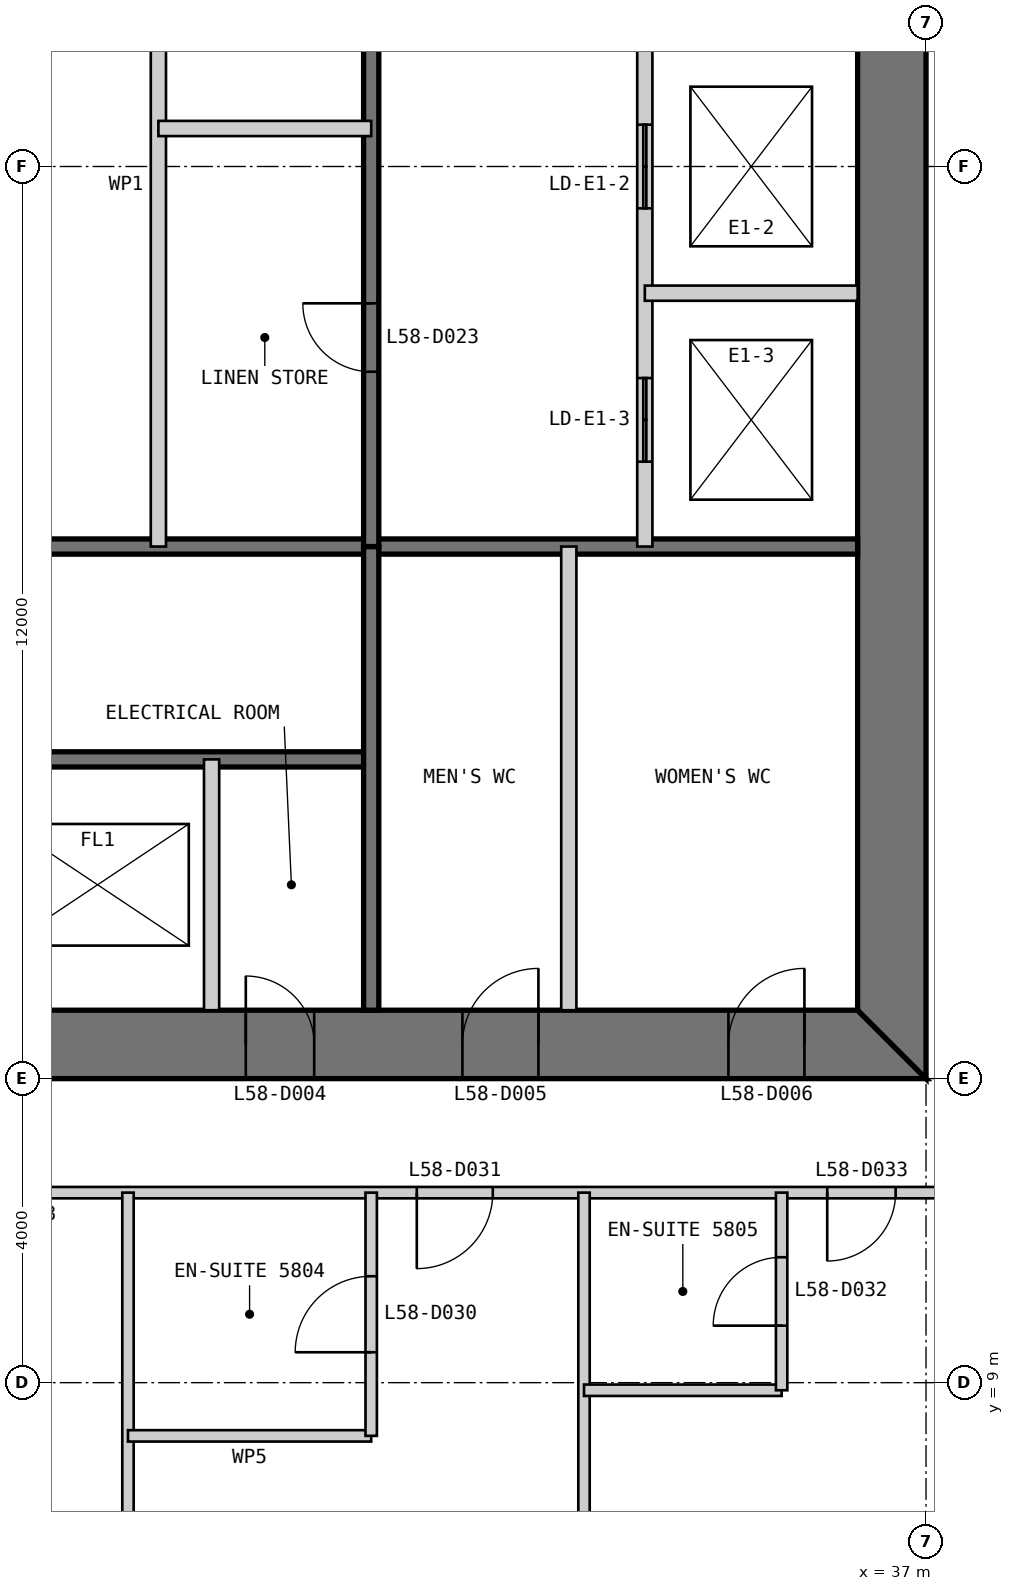
"""IFC4 building model, lengths in metres.
Left out: names, types, materials, properties, quantities, classifications, styles, units other than length and angle.
Written with IfcOpenShell. Run it as: python <this file> out.ifc"""

import sys

from ifc_helpers import new_model, si_unit, direction, frame, frame_2d, origin, place, context, subcontext, project, spatial, polyline, rectangle, outline, extrude, element, fill, save


model = new_model("IFC4")
c1 = context("Model", 3, precision=1e-05, world=origin(), true_north=direction((0.0, 1.0)))
c2 = subcontext(c1, "Body", "Model", "MODEL_VIEW")
j1 = project(units=[si_unit("LENGTHUNIT", "METRE"), si_unit("PLANEANGLEUNIT", "RADIAN")], contexts=[c1])
p1 = place(None, origin())
s1 = spatial("IfcSite", under=j1, at=p1, CompositionType="ELEMENT")
p2 = place(p1, origin())
s2 = spatial("IfcBuilding", under=s1, at=p2, CompositionType="ELEMENT")
p3 = place(p2, frame((0.0, 0.0, 249.2)))
s3 = spatial("IfcBuildingStorey", under=s2, at=p3, CompositionType="ELEMENT", Elevation=249.2)
p4 = place(p3, frame((13.0, 13.45, 0.0), z_axis=(0.0, 0.0, 1.0), x_axis=(1.0, 0.0, 0.0)))
e1 = element("IfcWall", 1, at=p4, inside=s3, PredefinedType="SHEAR", context=c2, shape_type="SweptSolid", body=[
    extrude(outline(polyline([(0.0, -0.45), (24.0, -0.45), (23.1, 0.45), (0.9, 0.45), (0.0, -0.45)])), origin(), (0.0, 0.0, 1.0), 3.4),
])
p5 = place(p4, frame((4.9, 0.0, 0.0)))
e2 = element("IfcOpeningElement", 2, at=p5, cuts=e1, PredefinedType="OPENING", context=c2, shape_type="SweptSolid", body=[
    extrude(rectangle(XDim=1.0, YDim=2.2, at=frame_2d((0.5, 1.1))), frame((0.0, 0.46, 0.0), z_axis=(0.0, -1.0, 0.0), x_axis=(1.0, 0.0, 0.0)), (0.0, 0.0, 1.0), 0.92),
])
p6 = place(p4, frame((8.9, 0.0, 0.0)))
e3 = element("IfcOpeningElement", 3, at=p6, cuts=e1, PredefinedType="OPENING", context=c2, shape_type="SweptSolid", body=[
    extrude(rectangle(XDim=1.1, YDim=2.2, at=frame_2d((0.55, 1.1))), frame((0.0, 0.46, 0.0), z_axis=(0.0, -1.0, 0.0), x_axis=(1.0, 0.0, 0.0)), (0.0, 0.0, 1.0), 0.92),
])
p7 = place(p4, frame((15.05, 0.0, 0.0)))
e4 = element("IfcOpeningElement", 4, at=p7, cuts=e1, PredefinedType="OPENING", context=c2, shape_type="SweptSolid", body=[
    extrude(rectangle(XDim=0.9, YDim=2.2, at=frame_2d((0.45, 1.1))), frame((0.0, 0.46, 0.0), z_axis=(0.0, -1.0, 0.0), x_axis=(1.0, 0.0, 0.0)), (0.0, 0.0, 1.0), 0.92),
])
p8 = place(p4, frame((17.9, 0.0, 0.0)))
e5 = element("IfcOpeningElement", 5, at=p8, cuts=e1, PredefinedType="OPENING", context=c2, shape_type="SweptSolid", body=[
    extrude(rectangle(XDim=1.0, YDim=2.2, at=frame_2d((0.5, 1.1))), frame((0.0, 0.46, 0.0), z_axis=(0.0, -1.0, 0.0), x_axis=(1.0, 0.0, 0.0)), (0.0, 0.0, 1.0), 0.92),
])
p9 = place(p4, frame((21.4, 0.0, 0.0)))
e6 = element("IfcOpeningElement", 6, at=p9, cuts=e1, PredefinedType="OPENING", context=c2, shape_type="SweptSolid", body=[
    extrude(rectangle(XDim=1.0, YDim=2.2, at=frame_2d((0.5, 1.1))), frame((0.0, 0.46, 0.0), z_axis=(0.0, -1.0, 0.0), x_axis=(1.0, 0.0, 0.0)), (0.0, 0.0, 1.0), 0.92),
])
p10 = place(p3, frame((36.55, 13.9, 0.0), z_axis=(0.0, 0.0, 1.0), x_axis=(0.0, 1.0, 0.0)))
e7 = element("IfcWall", 7, at=p10, inside=s3, PredefinedType="SHEAR", context=c2, shape_type="SweptSolid", body=[
    extrude(outline(polyline([(-0.9, -0.45), (23.1, -0.45), (22.2, 0.45), (0.0, 0.45), (-0.9, -0.45)])), origin(), (0.0, 0.0, 1.0), 3.4),
])
p11 = place(p10, frame((20.2, 0.0, 0.0)))
e8 = element("IfcOpeningElement", 8, at=p11, cuts=e7, PredefinedType="OPENING", context=c2, shape_type="SweptSolid", body=[
    extrude(rectangle(XDim=1.0, YDim=2.2, at=frame_2d((0.5, 1.1))), frame((0.0, 0.46, 0.0), z_axis=(0.0, -1.0, 0.0), x_axis=(1.0, 0.0, 0.0)), (0.0, 0.0, 1.0), 0.92),
])
p12 = place(p10, frame((17.25, 0.0, 0.0)))
e9 = element("IfcOpeningElement", 9, at=p12, cuts=e7, PredefinedType="OPENING", context=c2, shape_type="SweptSolid", body=[
    extrude(rectangle(XDim=0.9, YDim=2.2, at=frame_2d((0.45, 1.1))), frame((0.0, 0.46, 0.0), z_axis=(0.0, -1.0, 0.0), x_axis=(1.0, 0.0, 0.0)), (0.0, 0.0, 1.0), 0.92),
])
p13 = place(p3, frame((20.3, 17.2, 0.0), z_axis=(0.0, 0.0, 1.0), x_axis=(1.0, 0.0, 0.0)))
e10 = element("IfcWall", 10, at=p13, inside=s3, PredefinedType="SOLIDWALL", context=c2, shape_type="SweptSolid", body=[
    extrude(rectangle(XDim=9.4, YDim=0.2, at=frame_2d((4.7, 0.0))), origin(), (0.0, 0.0, 1.0), 3.2),
])
p14 = place(p13, frame((0.25, 0.0, 0.0)))
e11 = element("IfcOpeningElement", 11, at=p14, cuts=e10, PredefinedType="OPENING", context=c2, shape_type="SweptSolid", body=[
    extrude(rectangle(XDim=1.0, YDim=2.2, at=frame_2d((0.5, 1.1))), frame((0.0, 0.11, 0.0), z_axis=(0.0, -1.0, 0.0), x_axis=(1.0, 0.0, 0.0)), (0.0, 0.0, 1.0), 0.22),
])
p15 = place(p3, frame((20.3, 20.0, 0.0), z_axis=(0.0, 0.0, 1.0), x_axis=(1.0, 0.0, 0.0)))
e12 = element("IfcWall", 12, at=p15, inside=s3, PredefinedType="SOLIDWALL", context=c2, shape_type="SweptSolid", body=[
    extrude(rectangle(XDim=15.8, YDim=0.2, at=frame_2d((7.9, 0.0))), origin(), (0.0, 0.0, 1.0), 3.2),
])
p16 = place(p3, frame((27.6, 13.9, 0.0), z_axis=(0.0, 0.0, 1.0), x_axis=(0.0, 1.0, 0.0)))
e13 = element("IfcWall", 13, at=p16, inside=s3, PredefinedType="PARTITIONING", context=c2, shape_type="SweptSolid", body=[
    extrude(rectangle(XDim=3.3, YDim=0.2, at=frame_2d((1.65, 0.0))), origin(), (0.0, 0.0, 1.0), 3.2),
])
p17 = place(p3, frame((29.7, 13.9, 0.0), z_axis=(0.0, 0.0, 1.0), x_axis=(0.0, 1.0, 0.0)))
e14 = element("IfcWall", 14, at=p17, inside=s3, PredefinedType="SOLIDWALL", context=c2, shape_type="SweptSolid", body=[
    extrude(rectangle(XDim=6.1, YDim=0.2, at=frame_2d((3.05, 0.0))), origin(), (0.0, 0.0, 1.0), 3.2),
])
p18 = place(p3, frame((32.3, 13.9, 0.0), z_axis=(0.0, 0.0, 1.0), x_axis=(0.0, 1.0, 0.0)))
e15 = element("IfcWall", 15, at=p18, inside=s3, PredefinedType="PARTITIONING", context=c2, shape_type="SweptSolid", body=[
    extrude(rectangle(XDim=6.1, YDim=0.2, at=frame_2d((3.05, 0.0))), origin(), (0.0, 0.0, 1.0), 3.2),
])
p19 = place(p3, frame((33.3, 36.1, 0.0), z_axis=(0.0, 0.0, 1.0), x_axis=(0.0, -1.0, 0.0)))
e16 = element("IfcWall", 16, at=p19, inside=s3, PredefinedType="PARTITIONING", context=c2, shape_type="SweptSolid", body=[
    extrude(rectangle(XDim=16.1, YDim=0.2, at=frame_2d((8.05, 0.0))), origin(), (0.0, 0.0, 1.0), 3.2),
])
p20 = place(p19, frame((7.217, 0.0, 0.0)))
e17 = element("IfcOpeningElement", 17, at=p20, cuts=e16, PredefinedType="OPENING", context=c2, shape_type="SweptSolid", body=[
    extrude(rectangle(XDim=1.1, YDim=2.2, at=frame_2d((0.55, 1.1))), frame((0.0, 0.11, 0.0), z_axis=(0.0, -1.0, 0.0), x_axis=(1.0, 0.0, 0.0)), (0.0, 0.0, 1.0), 0.22),
])
p21 = place(p19, frame((10.55, 0.0, 0.0)))
e18 = element("IfcOpeningElement", 18, at=p21, cuts=e16, PredefinedType="OPENING", context=c2, shape_type="SweptSolid", body=[
    extrude(rectangle(XDim=1.1, YDim=2.2, at=frame_2d((0.55, 1.1))), frame((0.0, 0.11, 0.0), z_axis=(0.0, -1.0, 0.0), x_axis=(1.0, 0.0, 0.0)), (0.0, 0.0, 1.0), 0.22),
])
p22 = place(p19, frame((13.883, 0.0, 0.0)))
e19 = element("IfcOpeningElement", 19, at=p22, cuts=e16, PredefinedType="OPENING", context=c2, shape_type="SweptSolid", body=[
    extrude(rectangle(XDim=1.1, YDim=2.2, at=frame_2d((0.55, 1.1))), frame((0.0, 0.11, 0.0), z_axis=(0.0, -1.0, 0.0), x_axis=(1.0, 0.0, 0.0)), (0.0, 0.0, 1.0), 0.22),
])
p23 = place(p3, frame((29.7, 36.1, 0.0), z_axis=(0.0, 0.0, 1.0), x_axis=(0.0, -1.0, 0.0)))
e20 = element("IfcWall", 20, at=p23, inside=s3, PredefinedType="SOLIDWALL", context=c2, shape_type="SweptSolid", body=[
    extrude(rectangle(XDim=16.1, YDim=0.2, at=frame_2d((8.05, 0.0))), origin(), (0.0, 0.0, 1.0), 3.2),
])
p24 = place(p23, frame((7.9, 0.0, 0.0)))
e21 = element("IfcOpeningElement", 21, at=p24, cuts=e20, PredefinedType="OPENING", context=c2, shape_type="SweptSolid", body=[
    extrude(rectangle(XDim=0.9, YDim=2.2, at=frame_2d((0.45, 1.1))), frame((0.0, 0.11, 0.0), z_axis=(0.0, -1.0, 0.0), x_axis=(1.0, 0.0, 0.0)), (0.0, 0.0, 1.0), 0.22),
])
p25 = place(p23, frame((12.9, 0.0, 0.0)))
e22 = element("IfcOpeningElement", 22, at=p25, cuts=e20, PredefinedType="OPENING", context=c2, shape_type="SweptSolid", body=[
    extrude(rectangle(XDim=0.9, YDim=2.2, at=frame_2d((0.45, 1.1))), frame((0.0, 0.11, 0.0), z_axis=(0.0, -1.0, 0.0), x_axis=(1.0, 0.0, 0.0)), (0.0, 0.0, 1.0), 0.22),
])
p26 = place(p3, frame((36.1, 23.333, 0.0), z_axis=(0.0, 0.0, 1.0), x_axis=(-1.0, 0.0, 0.0)))
e23 = element("IfcWall", 23, at=p26, inside=s3, PredefinedType="PARTITIONING", context=c2, shape_type="SweptSolid", body=[
    extrude(rectangle(XDim=2.8, YDim=0.2, at=frame_2d((1.4, 0.0))), origin(), (0.0, 0.0, 1.0), 3.2),
])
p27 = place(p3, frame((26.9, 30.0, 0.0), z_axis=(0.0, 0.0, 1.0), x_axis=(0.0, -1.0, 0.0)))
e24 = element("IfcWall", 24, at=p27, inside=s3, PredefinedType="PARTITIONING", context=c2, shape_type="SweptSolid", body=[
    extrude(rectangle(XDim=10.0, YDim=0.2, at=frame_2d((5.0, 0.0))), origin(), (0.0, 0.0, 1.0), 3.2),
])
p28 = place(p3, frame((29.7, 25.5, 0.0), z_axis=(0.0, 0.0, 1.0), x_axis=(-1.0, 0.0, 0.0)))
e25 = element("IfcWall", 25, at=p28, inside=s3, PredefinedType="PARTITIONING", context=c2, shape_type="SweptSolid", body=[
    extrude(rectangle(XDim=2.8, YDim=0.2, at=frame_2d((1.4, 0.0))), origin(), (0.0, 0.0, 1.0), 3.2),
])
p29 = place(p3, frame((11.5, 11.5, 0.0), z_axis=(0.0, 0.0, 1.0), x_axis=(1.0, 0.0, 0.0)))
e26 = element("IfcWall", 26, at=p29, inside=s3, PredefinedType="PARTITIONING", context=c2, shape_type="SweptSolid", body=[
    extrude(rectangle(XDim=27.0, YDim=0.15, at=frame_2d((13.5, 0.0))), origin(), (0.0, 0.0, 1.0), 3.25),
])
p30 = place(p29, frame((1.85, 0.0, 0.0)))
e27 = element("IfcOpeningElement", 27, at=p30, cuts=e26, PredefinedType="OPENING", context=c2, shape_type="SweptSolid", body=[
    extrude(rectangle(XDim=0.9, YDim=2.1, at=frame_2d((0.45, 1.05))), frame((0.0, 0.085, 0.0), z_axis=(0.0, -1.0, 0.0), x_axis=(1.0, 0.0, 0.0)), (0.0, 0.0, 1.0), 0.17),
])
p31 = place(p29, frame((6.2, 0.0, 0.0)))
e28 = element("IfcOpeningElement", 28, at=p31, cuts=e26, PredefinedType="OPENING", context=c2, shape_type="SweptSolid", body=[
    extrude(rectangle(XDim=0.9, YDim=2.1, at=frame_2d((0.45, 1.05))), frame((0.0, 0.085, 0.0), z_axis=(0.0, -1.0, 0.0), x_axis=(1.0, 0.0, 0.0)), (0.0, 0.0, 1.0), 0.17),
])
p32 = place(p29, frame((12.2, 0.0, 0.0)))
e29 = element("IfcOpeningElement", 29, at=p32, cuts=e26, PredefinedType="OPENING", context=c2, shape_type="SweptSolid", body=[
    extrude(rectangle(XDim=0.9, YDim=2.1, at=frame_2d((0.45, 1.05))), frame((0.0, 0.085, 0.0), z_axis=(0.0, -1.0, 0.0), x_axis=(1.0, 0.0, 0.0)), (0.0, 0.0, 1.0), 0.17),
])
p33 = place(p29, frame((18.8, 0.0, 0.0)))
e30 = element("IfcOpeningElement", 30, at=p33, cuts=e26, PredefinedType="OPENING", context=c2, shape_type="SweptSolid", body=[
    extrude(rectangle(XDim=1.0, YDim=2.1, at=frame_2d((0.5, 1.05))), frame((0.0, 0.085, 0.0), z_axis=(0.0, -1.0, 0.0), x_axis=(1.0, 0.0, 0.0)), (0.0, 0.0, 1.0), 0.17),
])
p34 = place(p29, frame((24.2, 0.0, 0.0)))
e31 = element("IfcOpeningElement", 31, at=p34, cuts=e26, PredefinedType="OPENING", context=c2, shape_type="SweptSolid", body=[
    extrude(rectangle(XDim=0.9, YDim=2.1, at=frame_2d((0.45, 1.05))), frame((0.0, 0.085, 0.0), z_axis=(0.0, -1.0, 0.0), x_axis=(1.0, 0.0, 0.0)), (0.0, 0.0, 1.0), 0.17),
])
p35 = place(p3, frame((26.5, 0.15, 0.0), z_axis=(0.0, 0.0, 1.0), x_axis=(0.0, 1.0, 0.0)))
e32 = element("IfcWall", 32, at=p35, inside=s3, PredefinedType="PARTITIONING", context=c2, shape_type="SweptSolid", body=[
    extrude(rectangle(XDim=11.35, YDim=0.15, at=frame_2d((5.675, 0.0))), origin(), (0.0, 0.0, 1.0), 3.25),
])
p36 = place(p3, frame((26.5, 8.3, 0.0), z_axis=(0.0, 0.0, 1.0), x_axis=(1.0, 0.0, 0.0)))
e33 = element("IfcWall", 33, at=p36, inside=s3, PredefinedType="PARTITIONING", context=c2, shape_type="SweptSolid", body=[
    extrude(rectangle(XDim=3.2, YDim=0.15, at=frame_2d((1.6, 0.0))), origin(), (0.0, 0.0, 1.0), 3.25),
])
p37 = place(p3, frame((29.7, 8.3, 0.0), z_axis=(0.0, 0.0, 1.0), x_axis=(0.0, 1.0, 0.0)))
e34 = element("IfcWall", 34, at=p37, inside=s3, PredefinedType="PARTITIONING", context=c2, shape_type="SweptSolid", body=[
    extrude(rectangle(XDim=3.2, YDim=0.15, at=frame_2d((1.6, 0.0))), origin(), (0.0, 0.0, 1.0), 3.25),
])
p38 = place(p37, frame((1.1, 0.0, 0.0)))
e35 = element("IfcOpeningElement", 35, at=p38, cuts=e34, PredefinedType="OPENING", context=c2, shape_type="SweptSolid", body=[
    extrude(rectangle(XDim=1.0, YDim=2.1, at=frame_2d((0.5, 1.05))), frame((0.0, 0.085, 0.0), z_axis=(0.0, -1.0, 0.0), x_axis=(1.0, 0.0, 0.0)), (0.0, 0.0, 1.0), 0.17),
])
p39 = place(p3, frame((32.5, 0.15, 0.0), z_axis=(0.0, 0.0, 1.0), x_axis=(0.0, 1.0, 0.0)))
e36 = element("IfcWall", 36, at=p39, inside=s3, PredefinedType="PARTITIONING", context=c2, shape_type="SweptSolid", body=[
    extrude(rectangle(XDim=11.35, YDim=0.15, at=frame_2d((5.675, 0.0))), origin(), (0.0, 0.0, 1.0), 3.25),
])
p40 = place(p3, frame((32.5, 8.9, 0.0), z_axis=(0.0, 0.0, 1.0), x_axis=(1.0, 0.0, 0.0)))
e37 = element("IfcWall", 37, at=p40, inside=s3, PredefinedType="PARTITIONING", context=c2, shape_type="SweptSolid", body=[
    extrude(rectangle(XDim=2.6, YDim=0.15, at=frame_2d((1.3, 0.0))), origin(), (0.0, 0.0, 1.0), 3.25),
])
p41 = place(p3, frame((35.1, 8.9, 0.0), z_axis=(0.0, 0.0, 1.0), x_axis=(0.0, 1.0, 0.0)))
e38 = element("IfcWall", 38, at=p41, inside=s3, PredefinedType="PARTITIONING", context=c2, shape_type="SweptSolid", body=[
    extrude(rectangle(XDim=2.6, YDim=0.15, at=frame_2d((1.3, 0.0))), origin(), (0.0, 0.0, 1.0), 3.25),
])
p42 = place(p41, frame((0.85, 0.0, 0.0)))
e39 = element("IfcOpeningElement", 39, at=p42, cuts=e38, PredefinedType="OPENING", context=c2, shape_type="SweptSolid", body=[
    extrude(rectangle(XDim=0.9, YDim=2.1, at=frame_2d((0.45, 1.05))), frame((0.0, 0.085, 0.0), z_axis=(0.0, -1.0, 0.0), x_axis=(1.0, 0.0, 0.0)), (0.0, 0.0, 1.0), 0.17),
])
p43 = place(p7, origin())
e40 = element("IfcDoor", 40, at=p43, inside=s3, OperationType="SINGLE_SWING_LEFT", PredefinedType="DOOR", context=c2, shape_type="SweptSolid", body=[
    extrude(rectangle(XDim=0.9, YDim=2.2, at=frame_2d((0.45, 1.1))), frame((0.0, 0.025, 0.0), z_axis=(0.0, -1.0, 0.0), x_axis=(1.0, 0.0, 0.0)), (0.0, 0.0, 1.0), 0.05),
    extrude(outline(polyline([(0.0, 0.0), (0.04, 0.0), (0.04, 2.16), (0.86, 2.16), (0.86, 0.0), (0.9, 0.0), (0.9, 2.2), (0.0, 2.2), (0.0, 0.0)])), frame((0.0, 0.3, 0.0), z_axis=(0.0, -1.0, 0.0), x_axis=(1.0, 0.0, 0.0)), (0.0, 0.0, 1.0), 0.6),
])
fill(e4, e40)
p44 = place(p8, origin())
e41 = element("IfcDoor", 41, at=p44, inside=s3, OperationType="SINGLE_SWING_RIGHT", PredefinedType="DOOR", context=c2, shape_type="SweptSolid", body=[
    extrude(rectangle(XDim=1.0, YDim=2.2, at=frame_2d((0.5, 1.1))), frame((0.0, 0.025, 0.0), z_axis=(0.0, -1.0, 0.0), x_axis=(1.0, 0.0, 0.0)), (0.0, 0.0, 1.0), 0.05),
    extrude(outline(polyline([(0.0, 0.0), (0.04, 0.0), (0.04, 2.16), (0.96, 2.16), (0.96, 0.0), (1.0, 0.0), (1.0, 2.2), (0.0, 2.2), (0.0, 0.0)])), frame((0.0, 0.3, 0.0), z_axis=(0.0, -1.0, 0.0), x_axis=(1.0, 0.0, 0.0)), (0.0, 0.0, 1.0), 0.6),
])
fill(e5, e41)
p45 = place(p9, origin())
e42 = element("IfcDoor", 42, at=p45, inside=s3, OperationType="SINGLE_SWING_RIGHT", PredefinedType="DOOR", context=c2, shape_type="SweptSolid", body=[
    extrude(rectangle(XDim=1.0, YDim=2.2, at=frame_2d((0.5, 1.1))), frame((0.0, 0.025, 0.0), z_axis=(0.0, -1.0, 0.0), x_axis=(1.0, 0.0, 0.0)), (0.0, 0.0, 1.0), 0.05),
    extrude(outline(polyline([(0.0, 0.0), (0.04, 0.0), (0.04, 2.16), (0.96, 2.16), (0.96, 0.0), (1.0, 0.0), (1.0, 2.2), (0.0, 2.2), (0.0, 0.0)])), frame((0.0, 0.3, 0.0), z_axis=(0.0, -1.0, 0.0), x_axis=(1.0, 0.0, 0.0)), (0.0, 0.0, 1.0), 0.6),
])
fill(e6, e42)
p46 = place(p25, frame((0.9, 0.0, 0.0), z_axis=(0.0, 0.0, 1.0), x_axis=(-1.0, 0.0, 0.0)))
e43 = element("IfcDoor", 43, at=p46, inside=s3, OperationType="SINGLE_SWING_RIGHT", PredefinedType="DOOR", context=c2, shape_type="SweptSolid", body=[
    extrude(rectangle(XDim=0.9, YDim=2.2, at=frame_2d((0.45, 1.1))), frame((0.0, 0.025, 0.0), z_axis=(0.0, -1.0, 0.0), x_axis=(1.0, 0.0, 0.0)), (0.0, 0.0, 1.0), 0.05),
])
fill(e22, e43)
p47 = place(p38, origin())
e44 = element("IfcDoor", 44, at=p47, inside=s3, OperationType="SINGLE_SWING_LEFT", PredefinedType="DOOR", context=c2, shape_type="SweptSolid", body=[
    extrude(rectangle(XDim=1.0, YDim=2.1, at=frame_2d((0.5, 1.05))), frame((0.0, 0.025, 0.0), z_axis=(0.0, -1.0, 0.0), x_axis=(1.0, 0.0, 0.0)), (0.0, 0.0, 1.0), 0.05),
])
fill(e35, e44)
p48 = place(p33, frame((1.0, 0.0, 0.0), z_axis=(0.0, 0.0, 1.0), x_axis=(-1.0, 0.0, 0.0)))
e45 = element("IfcDoor", 45, at=p48, inside=s3, OperationType="SINGLE_SWING_RIGHT", PredefinedType="DOOR", context=c2, shape_type="SweptSolid", body=[
    extrude(rectangle(XDim=1.0, YDim=2.1, at=frame_2d((0.5, 1.05))), frame((0.0, 0.025, 0.0), z_axis=(0.0, -1.0, 0.0), x_axis=(1.0, 0.0, 0.0)), (0.0, 0.0, 1.0), 0.05),
])
fill(e30, e45)
p49 = place(p42, origin())
e46 = element("IfcDoor", 46, at=p49, inside=s3, OperationType="SINGLE_SWING_LEFT", PredefinedType="DOOR", context=c2, shape_type="SweptSolid", body=[
    extrude(rectangle(XDim=0.9, YDim=2.1, at=frame_2d((0.45, 1.05))), frame((0.0, 0.025, 0.0), z_axis=(0.0, -1.0, 0.0), x_axis=(1.0, 0.0, 0.0)), (0.0, 0.0, 1.0), 0.05),
])
fill(e39, e46)
p50 = place(p34, frame((0.9, 0.0, 0.0), z_axis=(0.0, 0.0, 1.0), x_axis=(-1.0, 0.0, 0.0)))
e47 = element("IfcDoor", 47, at=p50, inside=s3, OperationType="SINGLE_SWING_RIGHT", PredefinedType="DOOR", context=c2, shape_type="SweptSolid", body=[
    extrude(rectangle(XDim=0.9, YDim=2.1, at=frame_2d((0.45, 1.05))), frame((0.0, 0.025, 0.0), z_axis=(0.0, -1.0, 0.0), x_axis=(1.0, 0.0, 0.0)), (0.0, 0.0, 1.0), 0.05),
])
fill(e31, e47)
p51 = place(p21, origin())
e48 = element("IfcDoor", 48, at=p51, inside=s3, OperationType="DOUBLE_DOOR_SLIDING", PredefinedType="DOOR", context=c2, shape_type="SweptSolid", body=[
    extrude(rectangle(XDim=1.1, YDim=2.2, at=frame_2d((0.55, 1.1))), frame((0.0, 0.025, 0.0), z_axis=(0.0, -1.0, 0.0), x_axis=(1.0, 0.0, 0.0)), (0.0, 0.0, 1.0), 0.05),
])
fill(e18, e48)
p52 = place(p22, origin())
e49 = element("IfcDoor", 49, at=p52, inside=s3, OperationType="DOUBLE_DOOR_SLIDING", PredefinedType="DOOR", context=c2, shape_type="SweptSolid", body=[
    extrude(rectangle(XDim=1.1, YDim=2.2, at=frame_2d((0.55, 1.1))), frame((0.0, 0.025, 0.0), z_axis=(0.0, -1.0, 0.0), x_axis=(1.0, 0.0, 0.0)), (0.0, 0.0, 1.0), 0.05),
])
fill(e19, e49)
save(model, sys.argv[1])
